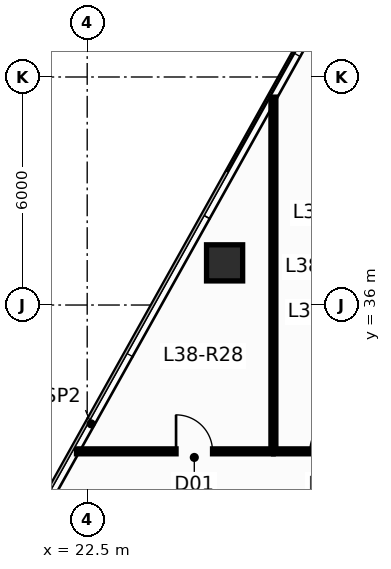
"""IFC4 building model, lengths in metres.
Left out: names, types, materials, properties, quantities, classifications, styles, units other than length and angle.
Written with IfcOpenShell. Run it as: python <this file> out.ifc"""

import sys

from ifc_helpers import new_model, si_unit, direction, frame, frame_2d, origin, origin_2d, place, context, subcontext, project, spatial, rectangle, hollow_rectangle, extrude, source, transform, mapped, element, fill, save


model = new_model("IFC4")
c1 = context("Model", 3, precision=1e-05, world=origin(), true_north=direction((0.0, 1.0)))
c2 = subcontext(c1, "Body", "Model", "MODEL_VIEW")
j1 = project(units=[si_unit("LENGTHUNIT", "METRE"), si_unit("PLANEANGLEUNIT", "RADIAN")], contexts=[c1])
p1 = place(None, origin())
s1 = spatial("IfcSite", under=j1, at=p1, CompositionType="ELEMENT")
p2 = place(p1, origin())
s2 = spatial("IfcBuilding", under=s1, at=p2, CompositionType="ELEMENT")
p3 = place(p2, frame((0.0, 0.0, 146.4)))
s3 = spatial("IfcBuildingStorey", under=s2, at=p3, CompositionType="ELEMENT", Elevation=146.4)
m1 = source(origin(), c2, "Body", "SweptSolid", [
    extrude(hollow_rectangle(XDim=0.95, YDim=0.95, WallThickness=0.05, at=origin_2d()), origin(), (0.0, 0.0, 1.0), 3.651),
])
p4 = place(p3, frame((26.115, 37.109, 0.0), z_axis=(0.01939269685, -0.00601842316, 0.999793829693), x_axis=(0.296399214872, 0.955064136811, 0.0)))
e1 = element("IfcColumn", 1, at=p4, inside=s3, PredefinedType="COLUMN", context=c2, shape_type="MappedRepresentation", body=[
    mapped(m1, transform((0.0, 0.0, 0.0), scale=1.0)),
])
p5 = place(p3, frame((27.4, 32.155, 0.0), z_axis=(0.0, 0.0, 1.0), x_axis=(0.0, 1.0, 0.0)))
e2 = element("IfcWall", 2, at=p5, inside=s3, PredefinedType="PARTITIONING", context=c2, shape_type="SweptSolid", body=[
    extrude(rectangle(XDim=9.316, YDim=0.13, at=frame_2d((4.658, 0.0))), origin(), (0.0, 0.0, 1.0), 3.25),
])
p6 = place(p3, frame((22.218, 32.15, 0.0), z_axis=(0.0, 0.0, 1.0), x_axis=(1.0, 0.0, 0.0)))
e3 = element("IfcWall", 3, at=p6, inside=s3, PredefinedType="PARTITIONING", context=c2, shape_type="SweptSolid", body=[
    extrude(rectangle(XDim=5.177, YDim=0.13, at=frame_2d((2.588, 0.0))), origin(), (0.0, 0.0, 1.0), 3.25),
])
p7 = place(p6, frame((2.62, 0.0, 0.0)))
e4 = element("IfcOpeningElement", 4, at=p7, cuts=e3, PredefinedType="OPENING", context=c2, shape_type="SweptSolid", body=[
    extrude(rectangle(XDim=0.96, YDim=2.15, at=frame_2d((0.48, 1.075))), frame((0.0, 0.077, 0.0), z_axis=(0.0, -1.0, 0.0), x_axis=(1.0, 0.0, 0.0)), (0.0, 0.0, 1.0), 0.154),
])
p8 = place(p3, frame((27.405, 32.15, 0.0), z_axis=(0.0, 0.0, 1.0), x_axis=(1.0, 0.0, 0.0)))
e5 = element("IfcWall", 5, at=p8, inside=s3, PredefinedType="PARTITIONING", context=c2, shape_type="SweptSolid", body=[
    extrude(rectangle(XDim=2.87, YDim=0.13, at=frame_2d((1.435, 0.0))), origin(), (0.0, 0.0, 1.0), 3.25),
])
p9 = place(p8, frame((0.955, 0.0, 0.0)))
e6 = element("IfcOpeningElement", 6, at=p9, cuts=e5, PredefinedType="OPENING", context=c2, shape_type="SweptSolid", body=[
    extrude(rectangle(XDim=0.96, YDim=2.15, at=frame_2d((0.48, 1.075))), frame((0.0, 0.077, 0.0), z_axis=(0.0, -1.0, 0.0), x_axis=(1.0, 0.0, 0.0)), (0.0, 0.0, 1.0), 0.154),
])
p10 = place(p7, origin())
e7 = element("IfcDoor", 7, at=p10, inside=s3, OperationType="SINGLE_SWING_LEFT", PredefinedType="DOOR", context=c2, shape_type="SweptSolid", body=[
    extrude(rectangle(XDim=0.96, YDim=2.15, at=frame_2d((0.48, 1.075))), frame((0.0, 0.025, 0.0), z_axis=(0.0, -1.0, 0.0), x_axis=(1.0, 0.0, 0.0)), (0.0, 0.0, 1.0), 0.05),
])
fill(e4, e7)
p11 = place(p9, origin())
e8 = element("IfcDoor", 8, at=p11, inside=s3, OperationType="SINGLE_SWING_RIGHT", PredefinedType="DOOR", context=c2, shape_type="SweptSolid", body=[
    extrude(rectangle(XDim=0.96, YDim=2.15, at=frame_2d((0.48, 1.075))), frame((0.0, 0.025, 0.0), z_axis=(0.0, -1.0, 0.0), x_axis=(1.0, 0.0, 0.0)), (0.0, 0.0, 1.0), 0.05),
])
fill(e6, e8)
save(model, sys.argv[1])
